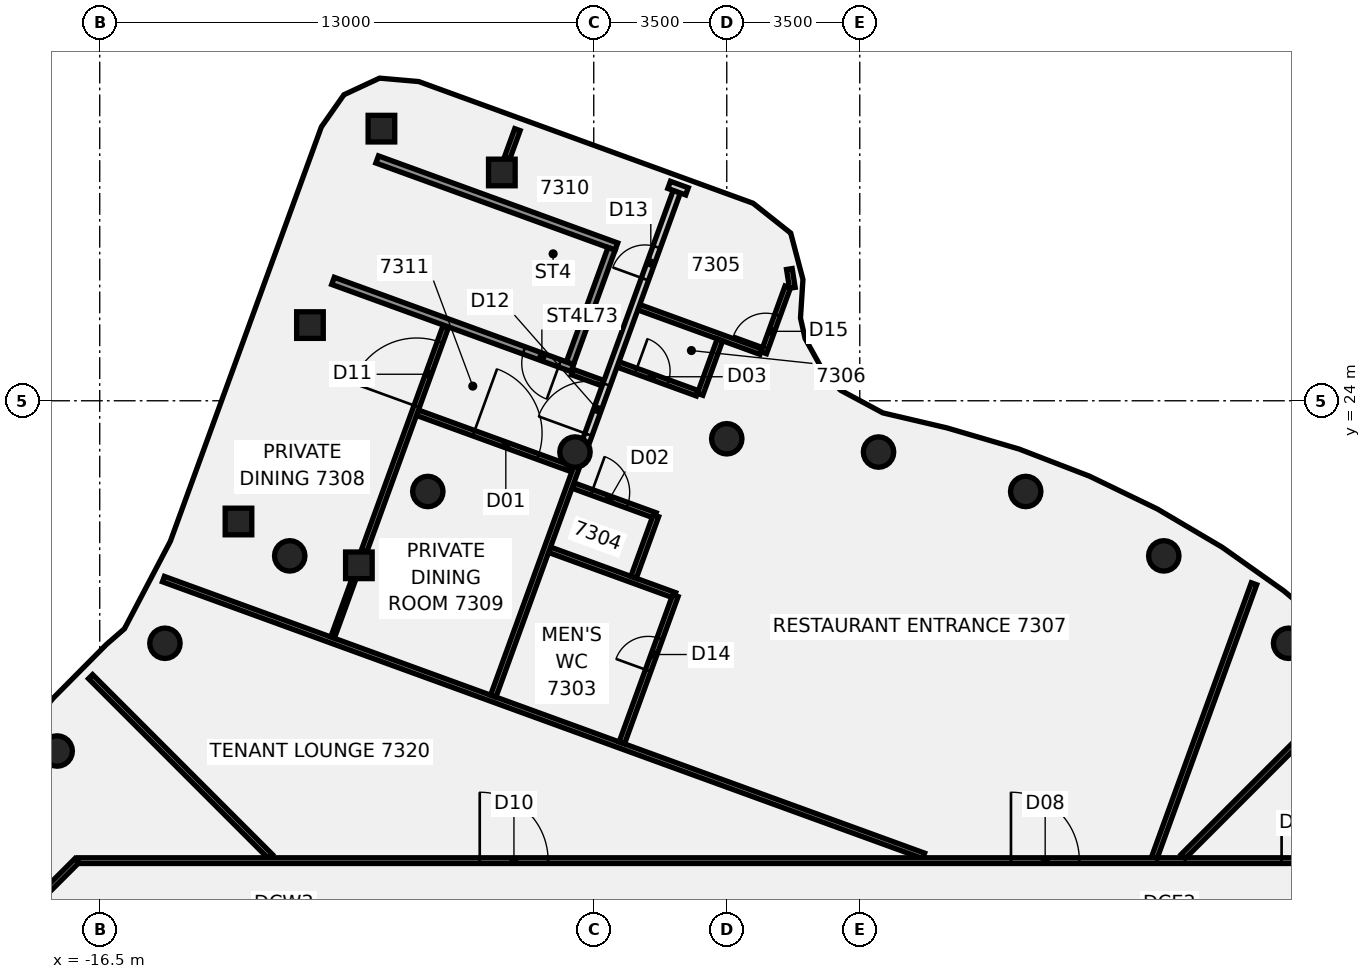
"""IFC4 building model, lengths in metres.
Left out: names, types, materials, properties, quantities, classifications, styles, units other than length and angle.
Written with IfcOpenShell. Run it as: python <this file> out.ifc"""

import sys

from ifc_helpers import new_model, si_unit, direction, frame, frame_2d, origin, origin_2d, place, context, subcontext, project, spatial, polyline, rectangle, circle, outline, extrude, element, fill, save


model = new_model("IFC4")
c1 = context("Model", 3, precision=1e-05, world=origin(), true_north=direction((0.0, 1.0)))
c2 = subcontext(c1, "Body", "Model", "MODEL_VIEW")
j1 = project(units=[si_unit("LENGTHUNIT", "METRE"), si_unit("PLANEANGLEUNIT", "RADIAN")], contexts=[c1])
p1 = place(None, origin())
s1 = spatial("IfcSite", under=j1, at=p1, CompositionType="ELEMENT")
p2 = place(p1, origin())
s2 = spatial("IfcBuilding", under=s1, at=p2, CompositionType="ELEMENT")
p3 = place(p2, frame((0.0, 0.0, 294.4)))
s3 = spatial("IfcBuildingStorey", under=s2, at=p3, CompositionType="ELEMENT", Elevation=294.4)
for number, where, z_axis, x_axis in (
    (1, (14.784, 17.619, -0.2), (0.0, 0.0, 1.0), (1.0, 0.0, 0.0)),
    (2, (11.5, 19.919, -0.2), (0.0, 0.0, 1.0), (1.0, 0.0, 0.0)),
    (3, (7.866, 21.613, -0.2), (0.0, 0.0, 1.0), (1.0, 0.0, 0.0)),
    (4, (3.994, 22.651, -0.2), (0.0, 0.0, 1.0), (1.0, 0.0, 0.0)),
    (5, (0.0, 23.0, -0.2), (0.0, 0.0, 1.0), (1.0, 0.0, 0.0)),
    (6, (-3.994, 22.651, -0.2), (0.0, 0.0, 1.0), (1.0, 0.0, 0.0)),
    (7, (-7.866, 21.613, -0.2), (0.0, 0.0, 1.0), (1.0, 0.0, 0.0)),
    (8, (-11.5, 19.919, -0.2), (0.0, 0.0, 1.0), (1.0, 0.0, 0.0)),
    (9, (-14.784, 17.619, -0.2), (0.0, 0.0, 1.0), (1.0, 0.0, 0.0)),
    (10, (-17.619, 14.784, -0.2), (0.0, 0.0, 1.0), (1.0, 0.0, 0.0)),
):
    element("IfcColumn", number, at=place(p3, frame(where, z_axis=z_axis, x_axis=x_axis)), inside=s3, PredefinedType="COLUMN", context=c2, shape_type="SweptSolid", body=[
        extrude(circle(Radius=0.4, at=origin_2d()), origin(), (0.0, 0.0, 1.0), 4.95),
    ])
for number, where, z_axis, x_axis in (
    (11, (-9.68, 19.67, -0.193), (0.0, 0.0, 1.0), (0.342, 0.94, 0.0)),
    (12, (-5.918, 30.007, -0.193), (0.0, 0.0, 1.0), (0.342, 0.94, 0.0)),
):
    element("IfcColumn", number, at=place(p3, frame(where, z_axis=z_axis, x_axis=x_axis)), inside=s3, PredefinedType="COLUMN", context=c2, shape_type="SweptSolid", body=[
        extrude(rectangle(XDim=0.7, YDim=0.7, at=origin_2d()), origin(), (0.0, 0.0, 1.0), 4.943),
    ])
p4 = place(p3, frame((-9.087, 31.16, -0.193), z_axis=(0.111858847363, -0.040734155336, 0.99288887941), x_axis=(0.34217490205, 0.939636278784, 0.0)))
e13 = element("IfcColumn", 13, at=p4, inside=s3, PredefinedType="COLUMN", context=c2, shape_type="SweptSolid", body=[
    extrude(rectangle(XDim=0.7, YDim=0.7, at=origin_2d()), origin(), (0.0, 0.0, 1.0), 4.957),
])
p5 = place(p3, frame((-10.968, 25.992, -0.191), z_axis=(0.111859442764, -0.040752316813, 0.992888067074), x_axis=(0.342307980656, 0.939587806636, 0.0)))
e14 = element("IfcColumn", 14, at=p5, inside=s3, PredefinedType="COLUMN", context=c2, shape_type="SweptSolid", body=[
    extrude(rectangle(XDim=0.7, YDim=0.7, at=origin_2d()), origin(), (0.0, 0.0, 1.0), 4.954),
])
p6 = place(p3, frame((-12.848, 20.823, -0.188), z_axis=(0.111865739051, -0.040723270364, 0.992888549474), x_axis=(-0.932990015184, 0.339642905483, 0.119047588479)))
e15 = element("IfcColumn", 15, at=p6, inside=s3, PredefinedType="COLUMN", context=c2, shape_type="SweptSolid", body=[
    extrude(rectangle(XDim=0.7, YDim=0.7, at=origin_2d()), origin(), (0.0, 0.0, 1.0), 4.952),
])
p7 = place(p3, frame((-16.74, 16.74, 0.0), z_axis=(0.0, 0.0, 1.0), x_axis=(0.707106781187, -0.707106781187, 0.0)))
e16 = element("IfcWall", 16, at=p7, inside=s3, PredefinedType="PARTITIONING", context=c2, shape_type="SweptSolid", body=[
    extrude(rectangle(XDim=6.691, YDim=0.15, at=frame_2d((3.345, 0.0))), origin(), (0.0, 0.0, 1.0), 4.05),
])
p8 = place(p3, frame((-14.823, 19.308, 0.0), z_axis=(0.0, 0.0, 1.0), x_axis=(0.939695278184, -0.342012842095, 0.0)))
e17 = element("IfcWall", 17, at=p8, inside=s3, PredefinedType="PARTITIONING", context=c2, shape_type="SweptSolid", body=[
    extrude(rectangle(XDim=21.289, YDim=0.15, at=frame_2d((10.644, 0.0))), origin(), (0.0, 0.0, 1.0), 4.05),
])
p9 = place(p3, frame((-8.139, 23.685, 0.0), z_axis=(0.0, 0.0, 1.0), x_axis=(0.939717938518, -0.341950575415, 0.0)))
e18 = element("IfcWall", 18, at=p9, inside=s3, PredefinedType="PARTITIONING", context=c2, shape_type="SweptSolid", body=[
    extrude(rectangle(XDim=4.345, YDim=0.15, at=frame_2d((2.173, 0.0))), origin(), (0.0, 0.0, 1.0), 4.05),
])
p10 = place(p9, frame((1.575, 0.0, 0.0)))
e19 = element("IfcOpeningElement", 19, at=p10, cuts=e18, PredefinedType="OPENING", context=c2, shape_type="SweptSolid", body=[
    extrude(rectangle(XDim=1.8, YDim=2.1, at=frame_2d((0.9, 1.05))), frame((0.0, 0.085, 0.0), z_axis=(0.0, -1.0, 0.0), x_axis=(1.0, 0.0, 0.0)), (0.0, 0.0, 1.0), 0.17),
])
p11 = place(p3, frame((-4.664, 20.079, 0.0), z_axis=(0.0, 0.0, 1.0), x_axis=(0.939632669741, -0.342184812574, 0.0)))
e20 = element("IfcWall", 20, at=p11, inside=s3, PredefinedType="PARTITIONING", context=c2, shape_type="SweptSolid", body=[
    extrude(rectangle(XDim=3.505, YDim=0.15, at=frame_2d((1.753, 0.0))), origin(), (0.0, 0.0, 1.0), 4.05),
])
p12 = place(p3, frame((-4.048, 21.77, 0.0), z_axis=(0.0, 0.0, 1.0), x_axis=(0.939651079277, -0.342134256123, 0.0)))
e21 = element("IfcWall", 21, at=p12, inside=s3, PredefinedType="PARTITIONING", context=c2, shape_type="SweptSolid", body=[
    extrude(rectangle(XDim=2.305, YDim=0.15, at=frame_2d((1.152, 0.0))), origin(), (0.0, 0.0, 1.0), 4.05),
])
p13 = place(p12, frame((0.525, 0.0, 0.0)))
e22 = element("IfcOpeningElement", 22, at=p13, cuts=e21, PredefinedType="OPENING", context=c2, shape_type="SweptSolid", body=[
    extrude(rectangle(XDim=1.0, YDim=2.1, at=frame_2d((0.5, 1.05))), frame((0.0, 0.085, 0.0), z_axis=(0.0, -1.0, 0.0), x_axis=(1.0, 0.0, 0.0)), (0.0, 0.0, 1.0), 0.17),
])
p14 = place(p3, frame((-4.063, 24.756, 0.0), z_axis=(0.0, 0.0, 1.0), x_axis=(0.939710329429, -0.341971485308, 0.0)))
e23 = element("IfcWall", 23, at=p14, inside=s3, PredefinedType="PARTITIONING", context=c2, shape_type="SweptSolid", body=[
    extrude(rectangle(XDim=0.858, YDim=0.15, at=frame_2d((0.429, 0.0))), origin(), (0.0, 0.0, 1.0), 4.05),
])
p15 = place(p3, frame((-2.861, 24.957, 0.0), z_axis=(0.0, 0.0, 1.0), x_axis=(0.93968419655, -0.342043287836, 0.0)))
e24 = element("IfcWall", 24, at=p15, inside=s3, PredefinedType="PARTITIONING", context=c2, shape_type="SweptSolid", body=[
    extrude(rectangle(XDim=2.22, YDim=0.15, at=frame_2d((1.11, 0.0))), origin(), (0.0, 0.0, 1.0), 4.05),
])
p16 = place(p15, frame((0.5, 0.0, 0.0)))
e25 = element("IfcOpeningElement", 25, at=p16, cuts=e24, PredefinedType="OPENING", context=c2, shape_type="SweptSolid", body=[
    extrude(rectangle(XDim=0.9, YDim=2.1, at=frame_2d((0.45, 1.05))), frame((0.0, 0.085, 0.0), z_axis=(0.0, -1.0, 0.0), x_axis=(1.0, 0.0, 0.0)), (0.0, 0.0, 1.0), 0.17),
])
p17 = place(p3, frame((-2.314, 26.461, 0.0), z_axis=(0.0, 0.0, 1.0), x_axis=(0.939653710072, -0.342127030718, 0.0)))
e26 = element("IfcWall", 26, at=p17, inside=s3, PredefinedType="PARTITIONING", context=c2, shape_type="SweptSolid", body=[
    extrude(rectangle(XDim=3.42, YDim=0.15, at=frame_2d((1.71, 0.0))), origin(), (0.0, 0.0, 1.0), 4.05),
])
p18 = place(p3, frame((-17.065, 11.9, 0.0), z_axis=(0.0, 0.0, 1.0), x_axis=(1.0, 0.0, 0.0)))
e27 = element("IfcWall", 27, at=p18, inside=s3, PredefinedType="PARTITIONING", context=c2, shape_type="SweptSolid", body=[
    extrude(rectangle(XDim=34.165, YDim=0.15, at=frame_2d((17.083, 0.0))), origin(), (0.0, 0.0, 1.0), 4.05),
])
p19 = place(p18, frame((24.544, 0.0, 0.0)))
e28 = element("IfcOpeningElement", 28, at=p19, cuts=e27, PredefinedType="OPENING", context=c2, shape_type="SweptSolid", body=[
    extrude(rectangle(XDim=1.8, YDim=2.1, at=frame_2d((0.9, 1.05))), frame((0.0, 0.085, 0.0), z_axis=(0.0, -1.0, 0.0), x_axis=(1.0, 0.0, 0.0)), (0.0, 0.0, 1.0), 0.17),
])
p20 = place(p18, frame((31.665, 0.0, 0.0)))
e29 = element("IfcOpeningElement", 29, at=p20, cuts=e27, PredefinedType="OPENING", context=c2, shape_type="SweptSolid", body=[
    extrude(rectangle(XDim=0.9, YDim=2.1, at=frame_2d((0.45, 1.05))), frame((0.0, 0.085, 0.0), z_axis=(0.0, -1.0, 0.0), x_axis=(1.0, 0.0, 0.0)), (0.0, 0.0, 1.0), 0.17),
])
p21 = place(p18, frame((10.565, 0.0, 0.0)))
e30 = element("IfcOpeningElement", 30, at=p21, cuts=e27, PredefinedType="OPENING", context=c2, shape_type="SweptSolid", body=[
    extrude(rectangle(XDim=1.8, YDim=2.1, at=frame_2d((0.9, 1.05))), frame((0.0, 0.085, 0.0), z_axis=(0.0, -1.0, 0.0), x_axis=(1.0, 0.0, 0.0)), (0.0, 0.0, 1.0), 0.17),
])
p22 = place(p3, frame((-18.872, 10.128, 0.0), z_axis=(0.0, 0.0, 1.0), x_axis=(0.707106781187, 0.707106781187, 0.0)))
e31 = element("IfcWall", 31, at=p22, inside=s3, PredefinedType="PARTITIONING", context=c2, shape_type="SweptSolid", body=[
    extrude(rectangle(XDim=2.505, YDim=0.15, at=frame_2d((1.253, 0.0))), origin(), (0.0, 0.0, 1.0), 4.05),
])
p23 = place(p3, frame((12.01, 12.01, 0.0), z_axis=(0.0, 0.0, 1.0), x_axis=(0.707106781187, 0.707106781187, 0.0)))
e32 = element("IfcWall", 32, at=p23, inside=s3, PredefinedType="PARTITIONING", context=c2, shape_type="SweptSolid", body=[
    extrude(rectangle(XDim=6.691, YDim=0.15, at=frame_2d((3.345, 0.0))), origin(), (0.0, 0.0, 1.0), 4.05),
])
p24 = place(p3, frame((-10.372, 17.772, 0.0), z_axis=(0.0, 0.0, 1.0), x_axis=(0.341926490553, 0.939726702322, 0.0)))
e33 = element("IfcWall", 33, at=p24, inside=s3, PredefinedType="PARTITIONING", context=c2, shape_type="SweptSolid", body=[
    extrude(rectangle(XDim=1.603, YDim=0.1, at=frame_2d((0.802, 0.0))), origin(), (0.0, 0.0, 1.0), 4.05),
])
p25 = place(p3, frame((-9.538, 20.062, 0.0), z_axis=(0.0, 0.0, 1.0), x_axis=(0.342025642212, 0.939690619337, 0.0)))
e34 = element("IfcWall", 34, at=p25, inside=s3, PredefinedType="PARTITIONING", context=c2, shape_type="SweptSolid", body=[
    extrude(rectangle(XDim=6.243, YDim=0.15, at=frame_2d((3.122, 0.0))), origin(), (0.0, 0.0, 1.0), 4.05),
])
p26 = place(p25, frame((4.033, 0.0, 0.0)))
e35 = element("IfcOpeningElement", 35, at=p26, cuts=e34, PredefinedType="OPENING", context=c2, shape_type="SweptSolid", body=[
    extrude(rectangle(XDim=1.8, YDim=2.1, at=frame_2d((0.9, 1.05))), frame((0.0, 0.085, 0.0), z_axis=(0.0, -1.0, 0.0), x_axis=(1.0, 0.0, 0.0)), (0.0, 0.0, 1.0), 0.17),
])
p27 = place(p3, frame((-5.776, 30.399, 0.0), z_axis=(0.0, 0.0, 1.0), x_axis=(0.342144074628, 0.939647504225, 0.0)))
e36 = element("IfcWall", 36, at=p27, inside=s3, PredefinedType="PARTITIONING", context=c2, shape_type="SweptSolid", body=[
    extrude(rectangle(XDim=0.782, YDim=0.15, at=frame_2d((0.391, 0.0))), origin(), (0.0, 0.0, 1.0), 4.05),
])
p28 = place(p3, frame((-6.144, 16.229, 0.0), z_axis=(0.0, 0.0, 1.0), x_axis=(0.341892869115, 0.93973893505, 0.0)))
e37 = element("IfcWall", 37, at=p28, inside=s3, PredefinedType="PARTITIONING", context=c2, shape_type="SweptSolid", body=[
    extrude(rectangle(XDim=6.542, YDim=0.15, at=frame_2d((3.271, 0.0))), origin(), (0.0, 0.0, 1.0), 4.05),
])
p29 = place(p3, frame((-3.754, 22.8, 0.0), z_axis=(0.0, 0.0, 1.0), x_axis=(0.341899737301, 0.939736436259, 0.0)))
e38 = element("IfcWall", 38, at=p29, inside=s3, PredefinedType="PARTITIONING", context=c2, shape_type="SweptSolid", body=[
    extrude(rectangle(XDim=7.131, YDim=0.2, at=frame_2d((3.566, 0.0))), origin(), (0.0, 0.0, 1.0), 4.05),
])
p30 = place(p29, frame((0.332, 0.0, 0.0)))
e39 = element("IfcOpeningElement", 39, at=p30, cuts=e38, PredefinedType="OPENING", context=c2, shape_type="SweptSolid", body=[
    extrude(rectangle(XDim=1.4, YDim=2.1, at=frame_2d((0.7, 1.05))), frame((0.0, 0.11, 0.0), z_axis=(0.0, -1.0, 0.0), x_axis=(1.0, 0.0, 0.0)), (0.0, 0.0, 1.0), 0.22),
])
p31 = place(p29, frame((4.683, 0.0, 0.0)))
e40 = element("IfcOpeningElement", 40, at=p31, cuts=e38, PredefinedType="OPENING", context=c2, shape_type="SweptSolid", body=[
    extrude(rectangle(XDim=0.9, YDim=2.1, at=frame_2d((0.45, 1.05))), frame((0.0, 0.11, 0.0), z_axis=(0.0, -1.0, 0.0), x_axis=(1.0, 0.0, 0.0)), (0.0, 0.0, 1.0), 0.22),
])
p32 = place(p3, frame((-2.761, 14.998, 0.0), z_axis=(0.0, 0.0, 1.0), x_axis=(0.341985460064, 0.939705243736, 0.0)))
e41 = element("IfcWall", 41, at=p32, inside=s3, PredefinedType="PARTITIONING", context=c2, shape_type="SweptSolid", body=[
    extrude(rectangle(XDim=4.124, YDim=0.15, at=frame_2d((2.062, 0.0))), origin(), (0.0, 0.0, 1.0), 4.05),
])
p33 = place(p32, frame((2.025, 0.0, 0.0)))
e42 = element("IfcOpeningElement", 42, at=p33, cuts=e41, PredefinedType="OPENING", context=c2, shape_type="SweptSolid", body=[
    extrude(rectangle(XDim=0.9, YDim=2.1, at=frame_2d((0.45, 1.05))), frame((0.0, 0.085, 0.0), z_axis=(0.0, -1.0, 0.0), x_axis=(1.0, 0.0, 0.0)), (0.0, 0.0, 1.0), 0.17),
])
p34 = place(p3, frame((0.975, 25.263, 0.0), z_axis=(0.0, 0.0, 1.0), x_axis=(0.341881428649, 0.939743097205, 0.0)))
e43 = element("IfcWall", 43, at=p34, inside=s3, PredefinedType="PARTITIONING", context=c2, shape_type="SweptSolid", body=[
    extrude(rectangle(XDim=1.842, YDim=0.15, at=frame_2d((0.921, 0.0))), origin(), (0.0, 0.0, 1.0), 4.05),
])
p35 = place(p34, frame((0.15, 0.0, 0.0)))
e44 = element("IfcOpeningElement", 44, at=p35, cuts=e43, PredefinedType="OPENING", context=c2, shape_type="SweptSolid", body=[
    extrude(rectangle(XDim=0.9, YDim=2.1, at=frame_2d((0.45, 1.05))), frame((0.0, 0.085, 0.0), z_axis=(0.0, -1.0, 0.0), x_axis=(1.0, 0.0, 0.0)), (0.0, 0.0, 1.0), 0.17),
])
p36 = place(p3, frame((-2.452, 19.354, 0.0), z_axis=(0.0, 0.0, 1.0), x_axis=(0.341765797908, 0.939785155969, 0.0)))
e45 = element("IfcWall", 45, at=p36, inside=s3, PredefinedType="PARTITIONING", context=c2, shape_type="SweptSolid", body=[
    extrude(rectangle(XDim=1.724, YDim=0.15, at=frame_2d((0.862, 0.0))), origin(), (0.0, 0.0, 1.0), 4.05),
])
p37 = place(p3, frame((-0.701, 24.17, 0.0), z_axis=(0.0, 0.0, 1.0), x_axis=(0.341897280994, 0.939737329922, 0.0)))
e46 = element("IfcWall", 46, at=p37, inside=s3, PredefinedType="PARTITIONING", context=c2, shape_type="SweptSolid", body=[
    extrude(rectangle(XDim=1.525, YDim=0.15, at=frame_2d((0.763, 0.0))), origin(), (0.0, 0.0, 1.0), 4.05),
])
p38 = place(p3, frame((11.254, 11.985, 0.0), z_axis=(0.0, 0.0, 1.0), x_axis=(0.341891443356, 0.939739453764, 0.0)))
e47 = element("IfcWall", 47, at=p38, inside=s3, PredefinedType="PARTITIONING", context=c2, shape_type="SweptSolid", body=[
    extrude(rectangle(XDim=7.662, YDim=0.15, at=frame_2d((3.831, 0.0))), origin(), (0.0, 0.0, 1.0), 4.05),
])
p39 = place(p3, frame((1.725, 26.972, 0.0), z_axis=(0.0, 0.0, 1.0), x_axis=(-0.155285488936, 0.987869635593, 0.0)))
e48 = element("IfcWall", 48, at=p39, inside=s3, PredefinedType="PARTITIONING", context=c2, shape_type="SweptSolid", body=[
    extrude(rectangle(XDim=0.5, YDim=0.15, at=frame_2d((0.25, 0.0))), origin(), (0.0, 0.0, 1.0), 4.05),
])
p40 = place(p3, frame((-1.046, 29.51, 0.0), z_axis=(0.0, 0.0, 1.0), x_axis=(-0.939736367656, 0.341899925862, 0.0)))
e49 = element("IfcWall", 49, at=p40, inside=s3, PredefinedType="PARTITIONING", context=c2, shape_type="SweptSolid", body=[
    extrude(rectangle(XDim=0.5, YDim=0.2, at=frame_2d((0.25, 0.0))), origin(), (0.0, 0.0, 1.0), 4.05),
])
p41 = place(p3, frame((-4.066, 24.863, -0.2), z_axis=(0.0, 0.0, 1.0), x_axis=(-0.939709347419, 0.341974183781, 0.0)))
e50 = element("IfcWall", 50, at=p41, inside=s3, PredefinedType="SHEAR", context=c2, shape_type="SweptSolid", body=[
    extrude(rectangle(XDim=6.7, YDim=0.2, at=frame_2d((3.35, 0.0))), origin(), (0.0, 0.0, 1.0), 4.95),
])
p42 = place(p41, frame((0.35, 0.0, 0.0)))
e51 = element("IfcOpeningElement", 51, at=p42, cuts=e50, PredefinedType="OPENING", context=c2, shape_type="SweptSolid", body=[
    extrude(rectangle(XDim=1.0, YDim=2.1, at=frame_2d((0.5, 1.05))), frame((0.0, 0.11, 0.0), z_axis=(0.0, -1.0, 0.0), x_axis=(1.0, 0.0, 0.0)), (0.0, 0.0, 1.0), 0.22),
])
p43 = place(p3, frame((-2.903, 28.058, -0.2), z_axis=(0.0, 0.0, 1.0), x_axis=(-0.939693375008, 0.342018071111, 0.0)))
e52 = element("IfcWall", 52, at=p43, inside=s3, PredefinedType="SHEAR", context=c2, shape_type="SweptSolid", body=[
    extrude(rectangle(XDim=6.7, YDim=0.2, at=frame_2d((3.35, 0.0))), origin(), (0.0, 0.0, 1.0), 4.95),
])
p44 = place(p3, frame((-3.031, 27.998, -0.2), z_axis=(0.0, 0.0, 1.0), x_axis=(-0.341975850632, -0.939708740826, 0.0)))
e53 = element("IfcWall", 53, at=p44, inside=s3, PredefinedType="SHEAR", context=c2, shape_type="SweptSolid", body=[
    extrude(rectangle(XDim=3.2, YDim=0.2, at=frame_2d((1.6, 0.0))), origin(), (0.0, 0.0, 1.0), 4.95),
])
p45 = place(p3, frame((0.0, 0.0, -0.2)))
e54 = element("IfcWall", 54, at=p45, inside=s3, PredefinedType="SHEAR", context=c2, shape_type="SweptSolid", body=[
    extrude(outline(polyline([(-9.045, 30.187), (-9.233, 30.256), (-10.328, 27.249), (-10.14, 27.18), (-9.045, 30.187)])), origin(), (0.0, 0.0, 1.0), 4.95),
])
p46 = place(p10, frame((1.8, 0.0, 0.0), z_axis=(0.0, 0.0, 1.0), x_axis=(-1.0, 0.0, 0.0)))
e55 = element("IfcDoor", 55, at=p46, inside=s3, OperationType="DOUBLE_DOOR_SINGLE_SWING", PredefinedType="DOOR", context=c2, shape_type="SweptSolid", body=[
    extrude(rectangle(XDim=1.8, YDim=2.1, at=frame_2d((0.9, 1.05))), frame((0.0, 0.025, 0.0), z_axis=(0.0, -1.0, 0.0), x_axis=(1.0, 0.0, 0.0)), (0.0, 0.0, 1.0), 0.05),
])
fill(e19, e55)
p47 = place(p13, frame((1.0, 0.0, 0.0), z_axis=(0.0, 0.0, 1.0), x_axis=(-1.0, 0.0, 0.0)))
e56 = element("IfcDoor", 56, at=p47, inside=s3, OperationType="SINGLE_SWING_LEFT", PredefinedType="DOOR", context=c2, shape_type="SweptSolid", body=[
    extrude(rectangle(XDim=1.0, YDim=2.1, at=frame_2d((0.5, 1.05))), frame((0.0, 0.025, 0.0), z_axis=(0.0, -1.0, 0.0), x_axis=(1.0, 0.0, 0.0)), (0.0, 0.0, 1.0), 0.05),
])
fill(e22, e56)
p48 = place(p16, origin())
e57 = element("IfcDoor", 57, at=p48, inside=s3, OperationType="SINGLE_SWING_RIGHT", PredefinedType="DOOR", context=c2, shape_type="SweptSolid", body=[
    extrude(rectangle(XDim=0.9, YDim=2.1, at=frame_2d((0.45, 1.05))), frame((0.0, 0.025, 0.0), z_axis=(0.0, -1.0, 0.0), x_axis=(1.0, 0.0, 0.0)), (0.0, 0.0, 1.0), 0.05),
])
fill(e25, e57)
p49 = place(p19, frame((1.8, 0.0, 0.0), z_axis=(0.0, 0.0, 1.0), x_axis=(-1.0, 0.0, 0.0)))
e58 = element("IfcDoor", 58, at=p49, inside=s3, OperationType="DOUBLE_DOOR_SINGLE_SWING", PredefinedType="DOOR", context=c2, shape_type="SweptSolid", body=[
    extrude(rectangle(XDim=1.8, YDim=2.1, at=frame_2d((0.9, 1.05))), frame((0.0, 0.025, 0.0), z_axis=(0.0, -1.0, 0.0), x_axis=(1.0, 0.0, 0.0)), (0.0, 0.0, 1.0), 0.05),
])
fill(e28, e58)
p50 = place(p20, origin())
e59 = element("IfcDoor", 59, at=p50, inside=s3, OperationType="SINGLE_SWING_LEFT", PredefinedType="DOOR", context=c2, shape_type="SweptSolid", body=[
    extrude(rectangle(XDim=0.9, YDim=2.1, at=frame_2d((0.45, 1.05))), frame((0.0, 0.025, 0.0), z_axis=(0.0, -1.0, 0.0), x_axis=(1.0, 0.0, 0.0)), (0.0, 0.0, 1.0), 0.05),
])
fill(e29, e59)
p51 = place(p21, origin())
e60 = element("IfcDoor", 60, at=p51, inside=s3, OperationType="DOUBLE_DOOR_SINGLE_SWING", PredefinedType="DOOR", context=c2, shape_type="SweptSolid", body=[
    extrude(rectangle(XDim=1.8, YDim=2.1, at=frame_2d((0.9, 1.05))), frame((0.0, 0.025, 0.0), z_axis=(0.0, -1.0, 0.0), x_axis=(1.0, 0.0, 0.0)), (0.0, 0.0, 1.0), 0.05),
])
fill(e30, e60)
p52 = place(p26, origin())
e61 = element("IfcDoor", 61, at=p52, inside=s3, OperationType="DOUBLE_DOOR_SINGLE_SWING", PredefinedType="DOOR", context=c2, shape_type="SweptSolid", body=[
    extrude(rectangle(XDim=1.8, YDim=2.1, at=frame_2d((0.9, 1.05))), frame((0.0, 0.025, 0.0), z_axis=(0.0, -1.0, 0.0), x_axis=(1.0, 0.0, 0.0)), (0.0, 0.0, 1.0), 0.05),
])
fill(e35, e61)
p53 = place(p30, frame((1.4, 0.0, 0.0), z_axis=(0.0, 0.0, 1.0), x_axis=(-1.0, 0.0, 0.0)))
e62 = element("IfcDoor", 62, at=p53, inside=s3, OperationType="DOUBLE_DOOR_SINGLE_SWING", PredefinedType="DOOR", context=c2, shape_type="SweptSolid", body=[
    extrude(rectangle(XDim=1.4, YDim=2.1, at=frame_2d((0.7, 1.05))), frame((0.0, 0.025, 0.0), z_axis=(0.0, -1.0, 0.0), x_axis=(1.0, 0.0, 0.0)), (0.0, 0.0, 1.0), 0.05),
])
fill(e39, e62)
p54 = place(p31, origin())
e63 = element("IfcDoor", 63, at=p54, inside=s3, OperationType="SINGLE_SWING_LEFT", PredefinedType="DOOR", context=c2, shape_type="SweptSolid", body=[
    extrude(rectangle(XDim=0.9, YDim=2.1, at=frame_2d((0.45, 1.05))), frame((0.0, 0.025, 0.0), z_axis=(0.0, -1.0, 0.0), x_axis=(1.0, 0.0, 0.0)), (0.0, 0.0, 1.0), 0.05),
])
fill(e40, e63)
p55 = place(p33, origin())
e64 = element("IfcDoor", 64, at=p55, inside=s3, OperationType="SINGLE_SWING_LEFT", PredefinedType="DOOR", context=c2, shape_type="SweptSolid", body=[
    extrude(rectangle(XDim=0.9, YDim=2.1, at=frame_2d((0.45, 1.05))), frame((0.0, 0.025, 0.0), z_axis=(0.0, -1.0, 0.0), x_axis=(1.0, 0.0, 0.0)), (0.0, 0.0, 1.0), 0.05),
])
fill(e42, e64)
p56 = place(p35, origin())
e65 = element("IfcDoor", 65, at=p56, inside=s3, OperationType="SINGLE_SWING_RIGHT", PredefinedType="DOOR", context=c2, shape_type="SweptSolid", body=[
    extrude(rectangle(XDim=0.9, YDim=2.1, at=frame_2d((0.45, 1.05))), frame((0.0, 0.025, 0.0), z_axis=(0.0, -1.0, 0.0), x_axis=(1.0, 0.0, 0.0)), (0.0, 0.0, 1.0), 0.05),
])
fill(e44, e65)
p57 = place(p42, origin())
e66 = element("IfcDoor", 66, at=p57, inside=s3, OperationType="SINGLE_SWING_LEFT", PredefinedType="DOOR", context=c2, shape_type="SweptSolid", body=[
    extrude(rectangle(XDim=1.0, YDim=2.1, at=frame_2d((0.5, 1.05))), frame((0.0, 0.025, 0.0), z_axis=(0.0, -1.0, 0.0), x_axis=(1.0, 0.0, 0.0)), (0.0, 0.0, 1.0), 0.05),
])
fill(e51, e66)
save(model, sys.argv[1])
